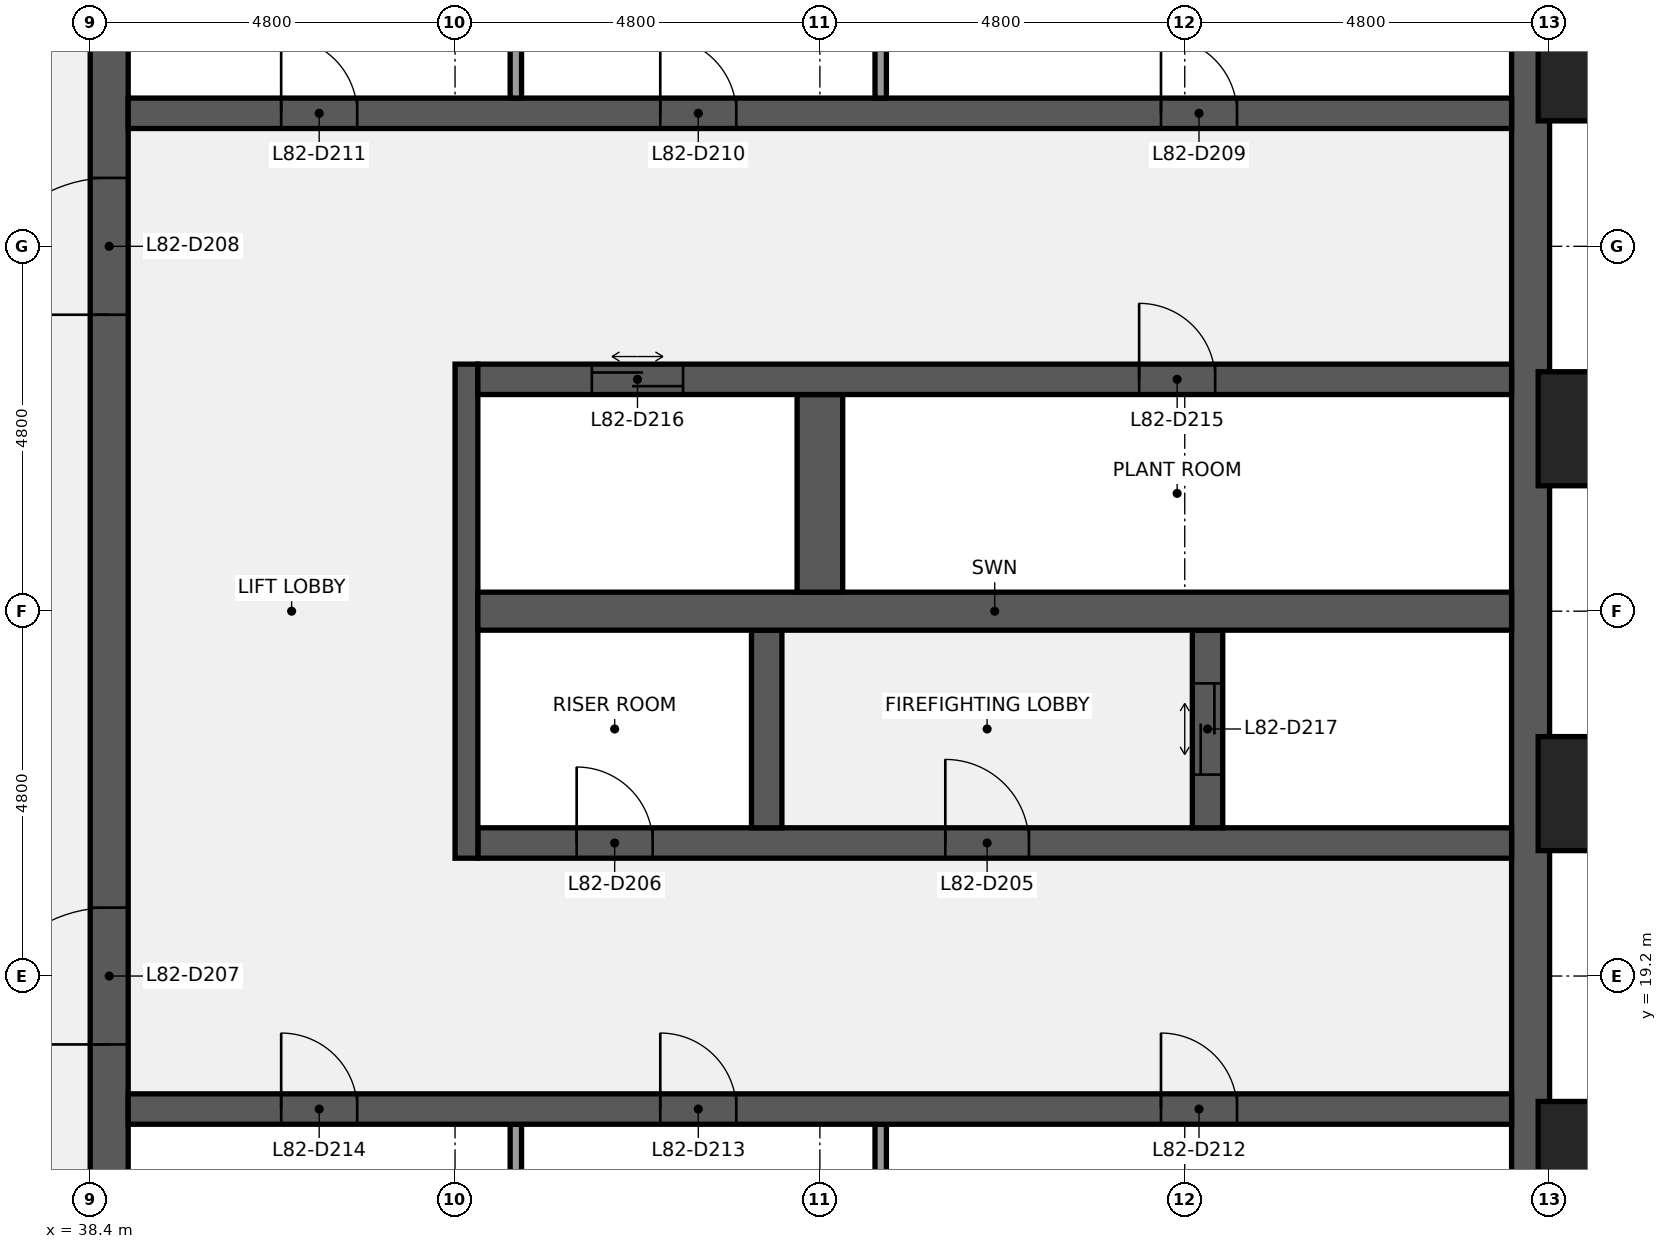
"""IFC4 building model, lengths in metres.
Left out: names, types, materials, properties, quantities, classifications, styles, units other than length and angle.
Written with IfcOpenShell. Run it as: python <this file> out.ifc"""

import sys

from ifc_helpers import new_model, si_unit, direction, frame, frame_2d, origin, origin_2d, place, context, subcontext, project, spatial, rectangle, extrude, element, fill, save


model = new_model("IFC4")
c1 = context("Model", 3, precision=1e-05, world=origin(), true_north=direction((0.0, 1.0)))
c2 = subcontext(c1, "Body", "Model", "MODEL_VIEW")
j1 = project(units=[si_unit("LENGTHUNIT", "METRE"), si_unit("PLANEANGLEUNIT", "RADIAN")], contexts=[c1])
p1 = place(None, origin())
s1 = spatial("IfcSite", under=j1, at=p1, CompositionType="ELEMENT")
p2 = place(p1, origin())
s2 = spatial("IfcBuilding", under=s1, at=p2, CompositionType="ELEMENT")
p3 = place(p2, frame((0.0, 0.0, 366.3)))
s3 = spatial("IfcBuildingStorey", under=s2, at=p3, CompositionType="ELEMENT", Elevation=366.3)
p4 = place(p3, frame((57.35, 38.4, 0.0), z_axis=(0.0, 0.0, 1.0), x_axis=(0.0, -1.0, 0.0)))
e1 = element("IfcWall", 1, at=p4, inside=s3, PredefinedType="SHEAR", context=c2, shape_type="SweptSolid", body=[
    extrude(rectangle(XDim=28.8, YDim=0.5, at=frame_2d((14.4, 0.0))), origin(), (0.0, 0.0, 1.0), 3.75),
])
p5 = place(p3, frame((38.65, 9.6, 0.0), z_axis=(0.0, 0.0, 1.0), x_axis=(0.0, 1.0, 0.0)))
e2 = element("IfcWall", 2, at=p5, inside=s3, PredefinedType="SHEAR", context=c2, shape_type="SweptSolid", body=[
    extrude(rectangle(XDim=28.8, YDim=0.5, at=frame_2d((14.4, 0.0))), origin(), (0.0, 0.0, 1.0), 3.75),
])
p6 = place(p5, frame((8.7, 0.0, 0.0)))
e3 = element("IfcOpeningElement", 3, at=p6, cuts=e2, PredefinedType="OPENING", context=c2, shape_type="SweptSolid", body=[
    extrude(rectangle(XDim=1.8, YDim=2.1, at=frame_2d((0.9, 1.05))), frame((0.0, 0.26, 0.0), z_axis=(0.0, -1.0, 0.0), x_axis=(1.0, 0.0, 0.0)), (0.0, 0.0, 1.0), 0.52),
])
p7 = place(p5, frame((18.3, 0.0, 0.0)))
e4 = element("IfcOpeningElement", 4, at=p7, cuts=e2, PredefinedType="OPENING", context=c2, shape_type="SweptSolid", body=[
    extrude(rectangle(XDim=1.8, YDim=2.1, at=frame_2d((0.9, 1.05))), frame((0.0, 0.26, 0.0), z_axis=(0.0, -1.0, 0.0), x_axis=(1.0, 0.0, 0.0)), (0.0, 0.0, 1.0), 0.52),
])
for number, where, z_axis, x_axis in (
    (5, (48.8, 14.65, 0.0), (0.0, 0.0, 1.0), (0.0, 1.0, 0.0)),
    (6, (44.0, 14.65, 0.0), (0.0, 0.0, 1.0), (0.0, 1.0, 0.0)),
):
    element("IfcWall", number, at=place(p3, frame(where, z_axis=z_axis, x_axis=x_axis)), inside=s3, PredefinedType="PARTITIONING", context=c2, shape_type="SweptSolid", body=[
        extrude(rectangle(XDim=2.6, YDim=0.15, at=frame_2d((1.3, 0.0))), origin(), (0.0, 0.0, 1.0), 3.75),
    ])
p8 = place(p3, frame((38.9, 17.45, 0.0), z_axis=(0.0, 0.0, 1.0), x_axis=(1.0, 0.0, 0.0)))
e7 = element("IfcWall", 7, at=p8, inside=s3, PredefinedType="SHEAR", context=c2, shape_type="SweptSolid", body=[
    extrude(rectangle(XDim=18.2, YDim=0.4, at=frame_2d((9.1, 0.0))), origin(), (0.0, 0.0, 1.0), 3.75),
])
p9 = place(p8, frame((13.587, 0.0, 0.0)))
e8 = element("IfcOpeningElement", 8, at=p9, cuts=e7, PredefinedType="OPENING", context=c2, shape_type="SweptSolid", body=[
    extrude(rectangle(XDim=1.0, YDim=2.1, at=frame_2d((0.5, 1.05))), frame((0.0, 0.21, 0.0), z_axis=(0.0, -1.0, 0.0), x_axis=(1.0, 0.0, 0.0)), (0.0, 0.0, 1.0), 0.42),
])
p10 = place(p8, frame((7.0, 0.0, 0.0)))
e9 = element("IfcOpeningElement", 9, at=p10, cuts=e7, PredefinedType="OPENING", context=c2, shape_type="SweptSolid", body=[
    extrude(rectangle(XDim=1.0, YDim=2.1, at=frame_2d((0.5, 1.05))), frame((0.0, 0.21, 0.0), z_axis=(0.0, -1.0, 0.0), x_axis=(1.0, 0.0, 0.0)), (0.0, 0.0, 1.0), 0.42),
])
p11 = place(p8, frame((2.012, 0.0, 0.0)))
e10 = element("IfcOpeningElement", 10, at=p11, cuts=e7, PredefinedType="OPENING", context=c2, shape_type="SweptSolid", body=[
    extrude(rectangle(XDim=1.0, YDim=2.1, at=frame_2d((0.5, 1.05))), frame((0.0, 0.21, 0.0), z_axis=(0.0, -1.0, 0.0), x_axis=(1.0, 0.0, 0.0)), (0.0, 0.0, 1.0), 0.42),
])
p12 = place(p3, frame((43.5, 20.95, 0.0), z_axis=(0.0, 0.0, 1.0), x_axis=(1.0, 0.0, 0.0)))
e11 = element("IfcWall", 11, at=p12, inside=s3, PredefinedType="SHEAR", context=c2, shape_type="SweptSolid", body=[
    extrude(rectangle(XDim=13.6, YDim=0.4, at=frame_2d((6.8, 0.0))), origin(), (0.0, 0.0, 1.0), 3.75),
])
p13 = place(p12, frame((6.15, 0.0, 0.0)))
e12 = element("IfcOpeningElement", 12, at=p13, cuts=e11, PredefinedType="OPENING", context=c2, shape_type="SweptSolid", body=[
    extrude(rectangle(XDim=1.1, YDim=2.1, at=frame_2d((0.55, 1.05))), frame((0.0, 0.21, 0.0), z_axis=(0.0, -1.0, 0.0), x_axis=(1.0, 0.0, 0.0)), (0.0, 0.0, 1.0), 0.42),
])
p14 = place(p12, frame((1.3, 0.0, 0.0)))
e13 = element("IfcOpeningElement", 13, at=p14, cuts=e11, PredefinedType="OPENING", context=c2, shape_type="SweptSolid", body=[
    extrude(rectangle(XDim=1.0, YDim=2.1, at=frame_2d((0.5, 1.05))), frame((0.0, 0.21, 0.0), z_axis=(0.0, -1.0, 0.0), x_axis=(1.0, 0.0, 0.0)), (0.0, 0.0, 1.0), 0.42),
])
p15 = place(p3, frame((43.35, 20.75, 0.0), z_axis=(0.0, 0.0, 1.0), x_axis=(0.0, 1.0, 0.0)))
e14 = element("IfcWall", 14, at=p15, inside=s3, PredefinedType="SHEAR", context=c2, shape_type="SweptSolid", body=[
    extrude(rectangle(XDim=6.5, YDim=0.3, at=frame_2d((3.25, 0.0))), origin(), (0.0, 0.0, 1.0), 3.75),
])
p16 = place(p3, frame((53.1, 21.15, 0.0), z_axis=(0.0, 0.0, 1.0), x_axis=(0.0, 1.0, 0.0)))
e15 = element("IfcWall", 15, at=p16, inside=s3, PredefinedType="SHEAR", context=c2, shape_type="SweptSolid", body=[
    extrude(rectangle(XDim=2.6, YDim=0.4, at=frame_2d((1.3, 0.0))), origin(), (0.0, 0.0, 1.0), 3.75),
])
p17 = place(p16, frame((0.7, 0.0, 0.0)))
e16 = element("IfcOpeningElement", 16, at=p17, cuts=e15, PredefinedType="OPENING", context=c2, shape_type="SweptSolid", body=[
    extrude(rectangle(XDim=1.2, YDim=2.1, at=frame_2d((0.6, 1.05))), frame((0.0, 0.21, 0.0), z_axis=(0.0, -1.0, 0.0), x_axis=(1.0, 0.0, 0.0)), (0.0, 0.0, 1.0), 0.42),
])
p18 = place(p3, frame((47.3, 21.15, 0.0), z_axis=(0.0, 0.0, 1.0), x_axis=(0.0, 1.0, 0.0)))
e17 = element("IfcWall", 17, at=p18, inside=s3, PredefinedType="SHEAR", context=c2, shape_type="SweptSolid", body=[
    extrude(rectangle(XDim=2.6, YDim=0.4, at=frame_2d((1.3, 0.0))), origin(), (0.0, 0.0, 1.0), 3.75),
])
p19 = place(p3, frame((43.5, 24.0, 0.0), z_axis=(0.0, 0.0, 1.0), x_axis=(1.0, 0.0, 0.0)))
e18 = element("IfcWall", 18, at=p19, inside=s3, PredefinedType="SHEAR", context=c2, shape_type="SweptSolid", body=[
    extrude(rectangle(XDim=13.6, YDim=0.5, at=frame_2d((6.8, 0.0))), origin(), (0.0, 0.0, 1.0), 3.75),
])
p20 = place(p3, frame((48.0, 24.25, 0.0), z_axis=(0.0, 0.0, 1.0), x_axis=(0.0, 1.0, 0.0)))
e19 = element("IfcWall", 19, at=p20, inside=s3, PredefinedType="SHEAR", context=c2, shape_type="SweptSolid", body=[
    extrude(rectangle(XDim=2.6, YDim=0.6, at=frame_2d((1.3, 0.0))), origin(), (0.0, 0.0, 1.0), 3.75),
])
p21 = place(p3, frame((43.5, 27.05, 0.0), z_axis=(0.0, 0.0, 1.0), x_axis=(1.0, 0.0, 0.0)))
e20 = element("IfcWall", 20, at=p21, inside=s3, PredefinedType="SHEAR", context=c2, shape_type="SweptSolid", body=[
    extrude(rectangle(XDim=13.6, YDim=0.4, at=frame_2d((6.8, 0.0))), origin(), (0.0, 0.0, 1.0), 3.75),
])
p22 = place(p21, frame((8.7, 0.0, 0.0)))
e21 = element("IfcOpeningElement", 21, at=p22, cuts=e20, PredefinedType="OPENING", context=c2, shape_type="SweptSolid", body=[
    extrude(rectangle(XDim=1.0, YDim=2.1, at=frame_2d((0.5, 1.05))), frame((0.0, 0.21, 0.0), z_axis=(0.0, -1.0, 0.0), x_axis=(1.0, 0.0, 0.0)), (0.0, 0.0, 1.0), 0.42),
])
p23 = place(p21, frame((1.5, 0.0, 0.0)))
e22 = element("IfcOpeningElement", 22, at=p23, cuts=e20, PredefinedType="OPENING", context=c2, shape_type="SweptSolid", body=[
    extrude(rectangle(XDim=1.2, YDim=2.1, at=frame_2d((0.6, 1.05))), frame((0.0, 0.21, 0.0), z_axis=(0.0, -1.0, 0.0), x_axis=(1.0, 0.0, 0.0)), (0.0, 0.0, 1.0), 0.42),
])
p24 = place(p3, frame((38.9, 30.55, 0.0), z_axis=(0.0, 0.0, 1.0), x_axis=(1.0, 0.0, 0.0)))
e23 = element("IfcWall", 23, at=p24, inside=s3, PredefinedType="SHEAR", context=c2, shape_type="SweptSolid", body=[
    extrude(rectangle(XDim=18.2, YDim=0.4, at=frame_2d((9.1, 0.0))), origin(), (0.0, 0.0, 1.0), 3.75),
])
p25 = place(p24, frame((13.587, 0.0, 0.0)))
e24 = element("IfcOpeningElement", 24, at=p25, cuts=e23, PredefinedType="OPENING", context=c2, shape_type="SweptSolid", body=[
    extrude(rectangle(XDim=1.0, YDim=2.1, at=frame_2d((0.5, 1.05))), frame((0.0, 0.21, 0.0), z_axis=(0.0, -1.0, 0.0), x_axis=(1.0, 0.0, 0.0)), (0.0, 0.0, 1.0), 0.42),
])
p26 = place(p24, frame((7.0, 0.0, 0.0)))
e25 = element("IfcOpeningElement", 25, at=p26, cuts=e23, PredefinedType="OPENING", context=c2, shape_type="SweptSolid", body=[
    extrude(rectangle(XDim=1.0, YDim=2.1, at=frame_2d((0.5, 1.05))), frame((0.0, 0.21, 0.0), z_axis=(0.0, -1.0, 0.0), x_axis=(1.0, 0.0, 0.0)), (0.0, 0.0, 1.0), 0.42),
])
p27 = place(p24, frame((2.012, 0.0, 0.0)))
e26 = element("IfcOpeningElement", 26, at=p27, cuts=e23, PredefinedType="OPENING", context=c2, shape_type="SweptSolid", body=[
    extrude(rectangle(XDim=1.0, YDim=2.1, at=frame_2d((0.5, 1.05))), frame((0.0, 0.21, 0.0), z_axis=(0.0, -1.0, 0.0), x_axis=(1.0, 0.0, 0.0)), (0.0, 0.0, 1.0), 0.42),
])
for number, where, z_axis, x_axis in (
    (27, (48.8, 30.75, 0.0), (0.0, 0.0, 1.0), (0.0, 1.0, 0.0)),
    (28, (44.0, 30.75, 0.0), (0.0, 0.0, 1.0), (0.0, 1.0, 0.0)),
):
    element("IfcWall", number, at=place(p3, frame(where, z_axis=z_axis, x_axis=x_axis)), inside=s3, PredefinedType="PARTITIONING", context=c2, shape_type="SweptSolid", body=[
        extrude(rectangle(XDim=2.6, YDim=0.15, at=frame_2d((1.3, 0.0))), origin(), (0.0, 0.0, 1.0), 3.75),
    ])
for number, where, z_axis, x_axis in (
    (29, (58.35, 16.8, 0.0), (0.0, 0.0, 1.0), (0.0, 1.0, 0.0)),
    (30, (58.35, 21.6, 0.0), (0.0, 0.0, 1.0), (0.0, 1.0, 0.0)),
    (31, (58.35, 26.4, 0.0), (0.0, 0.0, 1.0), (0.0, 1.0, 0.0)),
    (32, (58.35, 31.2, 0.0), (0.0, 0.0, 1.0), (0.0, 1.0, 0.0)),
):
    element("IfcColumn", number, at=place(p3, frame(where, z_axis=z_axis, x_axis=x_axis)), inside=s3, PredefinedType="PILASTER", context=c2, shape_type="SweptSolid", body=[
        extrude(rectangle(XDim=1.8, YDim=1.5, at=origin_2d()), origin(), (0.0, 0.0, 1.0), 4.0),
    ])
p28 = place(p13, origin())
e33 = element("IfcDoor", 33, at=p28, inside=s3, OperationType="SINGLE_SWING_LEFT", PredefinedType="DOOR", context=c2, shape_type="SweptSolid", body=[
    extrude(rectangle(XDim=1.1, YDim=2.1, at=frame_2d((0.55, 1.05))), frame((0.0, 0.025, 0.0), z_axis=(0.0, -1.0, 0.0), x_axis=(1.0, 0.0, 0.0)), (0.0, 0.0, 1.0), 0.05),
])
fill(e12, e33)
p29 = place(p14, origin())
e34 = element("IfcDoor", 34, at=p29, inside=s3, OperationType="SINGLE_SWING_LEFT", PredefinedType="DOOR", context=c2, shape_type="SweptSolid", body=[
    extrude(rectangle(XDim=1.0, YDim=2.1, at=frame_2d((0.5, 1.05))), frame((0.0, 0.025, 0.0), z_axis=(0.0, -1.0, 0.0), x_axis=(1.0, 0.0, 0.0)), (0.0, 0.0, 1.0), 0.05),
])
fill(e13, e34)
p30 = place(p6, origin())
e35 = element("IfcDoor", 35, at=p30, inside=s3, OperationType="DOUBLE_DOOR_SINGLE_SWING", PredefinedType="DOOR", context=c2, shape_type="SweptSolid", body=[
    extrude(rectangle(XDim=1.8, YDim=2.1, at=frame_2d((0.9, 1.05))), frame((0.0, 0.025, 0.0), z_axis=(0.0, -1.0, 0.0), x_axis=(1.0, 0.0, 0.0)), (0.0, 0.0, 1.0), 0.05),
])
fill(e3, e35)
p31 = place(p7, origin())
e36 = element("IfcDoor", 36, at=p31, inside=s3, OperationType="DOUBLE_DOOR_SINGLE_SWING", PredefinedType="DOOR", context=c2, shape_type="SweptSolid", body=[
    extrude(rectangle(XDim=1.8, YDim=2.1, at=frame_2d((0.9, 1.05))), frame((0.0, 0.025, 0.0), z_axis=(0.0, -1.0, 0.0), x_axis=(1.0, 0.0, 0.0)), (0.0, 0.0, 1.0), 0.05),
])
fill(e4, e36)
p32 = place(p25, origin())
e37 = element("IfcDoor", 37, at=p32, inside=s3, OperationType="SINGLE_SWING_LEFT", PredefinedType="DOOR", context=c2, shape_type="SweptSolid", body=[
    extrude(rectangle(XDim=1.0, YDim=2.1, at=frame_2d((0.5, 1.05))), frame((0.0, 0.025, 0.0), z_axis=(0.0, -1.0, 0.0), x_axis=(1.0, 0.0, 0.0)), (0.0, 0.0, 1.0), 0.05),
])
fill(e24, e37)
p33 = place(p26, origin())
e38 = element("IfcDoor", 38, at=p33, inside=s3, OperationType="SINGLE_SWING_LEFT", PredefinedType="DOOR", context=c2, shape_type="SweptSolid", body=[
    extrude(rectangle(XDim=1.0, YDim=2.1, at=frame_2d((0.5, 1.05))), frame((0.0, 0.025, 0.0), z_axis=(0.0, -1.0, 0.0), x_axis=(1.0, 0.0, 0.0)), (0.0, 0.0, 1.0), 0.05),
])
fill(e25, e38)
p34 = place(p27, origin())
e39 = element("IfcDoor", 39, at=p34, inside=s3, OperationType="SINGLE_SWING_LEFT", PredefinedType="DOOR", context=c2, shape_type="SweptSolid", body=[
    extrude(rectangle(XDim=1.0, YDim=2.1, at=frame_2d((0.5, 1.05))), frame((0.0, 0.025, 0.0), z_axis=(0.0, -1.0, 0.0), x_axis=(1.0, 0.0, 0.0)), (0.0, 0.0, 1.0), 0.05),
])
fill(e26, e39)
p35 = place(p9, origin())
e40 = element("IfcDoor", 40, at=p35, inside=s3, OperationType="SINGLE_SWING_LEFT", PredefinedType="DOOR", context=c2, shape_type="SweptSolid", body=[
    extrude(rectangle(XDim=1.0, YDim=2.1, at=frame_2d((0.5, 1.05))), frame((0.0, 0.025, 0.0), z_axis=(0.0, -1.0, 0.0), x_axis=(1.0, 0.0, 0.0)), (0.0, 0.0, 1.0), 0.05),
])
fill(e8, e40)
p36 = place(p10, origin())
e41 = element("IfcDoor", 41, at=p36, inside=s3, OperationType="SINGLE_SWING_LEFT", PredefinedType="DOOR", context=c2, shape_type="SweptSolid", body=[
    extrude(rectangle(XDim=1.0, YDim=2.1, at=frame_2d((0.5, 1.05))), frame((0.0, 0.025, 0.0), z_axis=(0.0, -1.0, 0.0), x_axis=(1.0, 0.0, 0.0)), (0.0, 0.0, 1.0), 0.05),
])
fill(e9, e41)
p37 = place(p11, origin())
e42 = element("IfcDoor", 42, at=p37, inside=s3, OperationType="SINGLE_SWING_LEFT", PredefinedType="DOOR", context=c2, shape_type="SweptSolid", body=[
    extrude(rectangle(XDim=1.0, YDim=2.1, at=frame_2d((0.5, 1.05))), frame((0.0, 0.025, 0.0), z_axis=(0.0, -1.0, 0.0), x_axis=(1.0, 0.0, 0.0)), (0.0, 0.0, 1.0), 0.05),
])
fill(e10, e42)
p38 = place(p22, origin())
e43 = element("IfcDoor", 43, at=p38, inside=s3, OperationType="SINGLE_SWING_LEFT", PredefinedType="DOOR", context=c2, shape_type="SweptSolid", body=[
    extrude(rectangle(XDim=1.0, YDim=2.1, at=frame_2d((0.5, 1.05))), frame((0.0, 0.025, 0.0), z_axis=(0.0, -1.0, 0.0), x_axis=(1.0, 0.0, 0.0)), (0.0, 0.0, 1.0), 0.05),
])
fill(e21, e43)
p39 = place(p23, origin())
e44 = element("IfcDoor", 44, at=p39, inside=s3, OperationType="DOUBLE_DOOR_SLIDING", PredefinedType="DOOR", context=c2, shape_type="SweptSolid", body=[
    extrude(rectangle(XDim=1.2, YDim=2.1, at=frame_2d((0.6, 1.05))), frame((0.0, 0.025, 0.0), z_axis=(0.0, -1.0, 0.0), x_axis=(1.0, 0.0, 0.0)), (0.0, 0.0, 1.0), 0.05),
])
fill(e22, e44)
p40 = place(p17, origin())
e45 = element("IfcDoor", 45, at=p40, inside=s3, OperationType="DOUBLE_DOOR_SLIDING", PredefinedType="DOOR", context=c2, shape_type="SweptSolid", body=[
    extrude(rectangle(XDim=1.2, YDim=2.1, at=frame_2d((0.6, 1.05))), frame((0.0, 0.025, 0.0), z_axis=(0.0, -1.0, 0.0), x_axis=(1.0, 0.0, 0.0)), (0.0, 0.0, 1.0), 0.05),
])
fill(e16, e45)
save(model, sys.argv[1])
